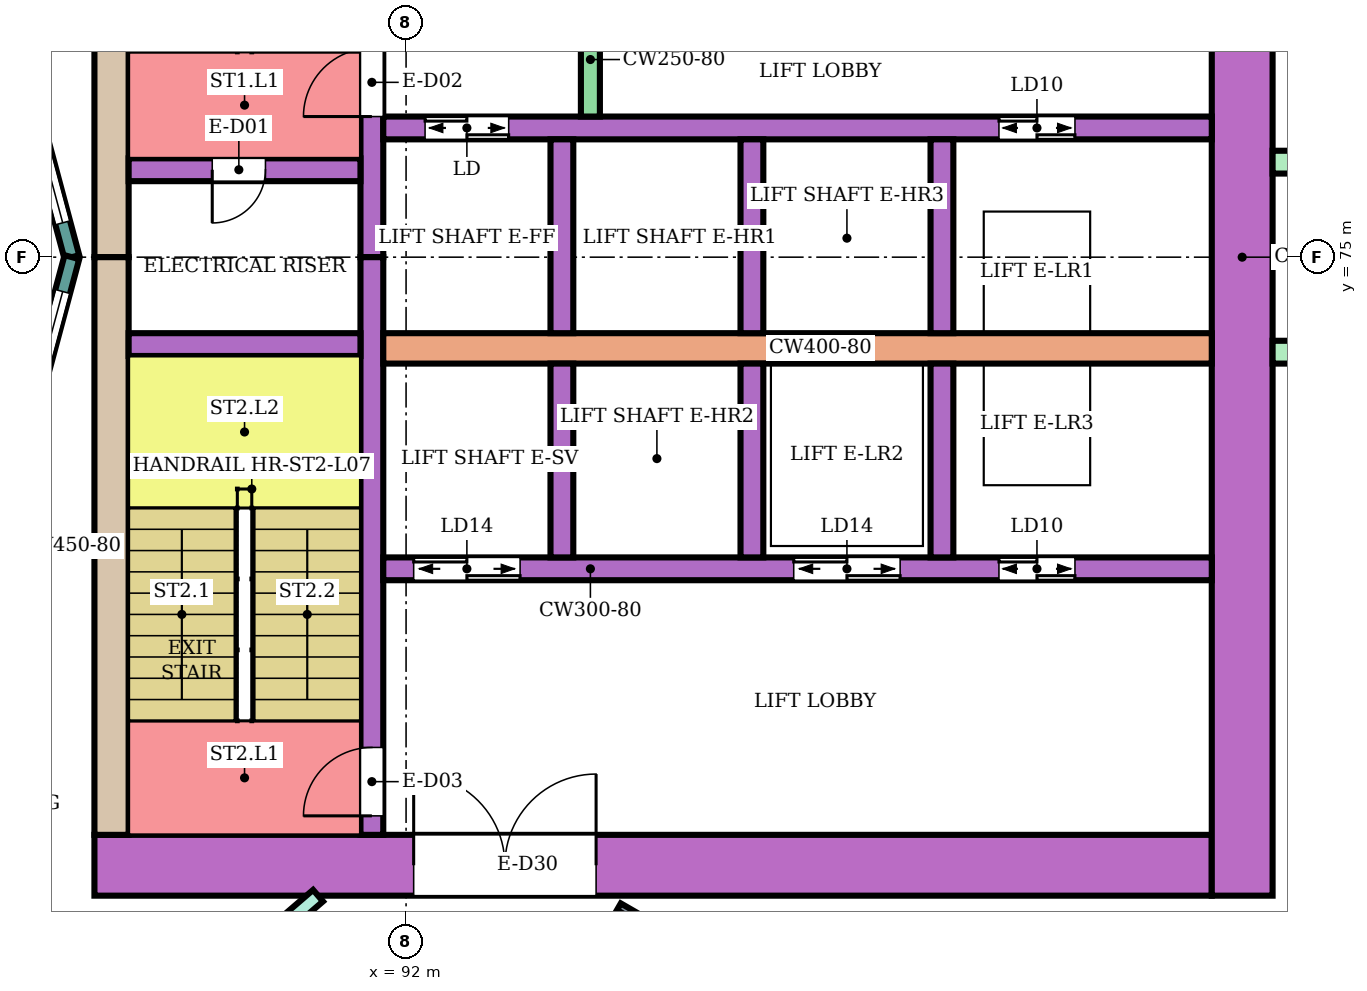
"""IFC4 building model, lengths in metres.
Left out: names, types, materials, properties, quantities, classifications, styles, units other than length and angle.
Written with IfcOpenShell. Run it as: python <this file> out.ifc"""

import sys

from ifc_helpers import new_model, si_unit, direction, frame, frame_2d, origin, place, context, subcontext, project, spatial, rectangle, extrude, element, fill, save


model = new_model("IFC4")
c1 = context("Model", 3, precision=1e-05, world=origin(), true_north=direction((0.0, 1.0)))
c2 = subcontext(c1, "Body", "Model", "MODEL_VIEW")
j1 = project(units=[si_unit("LENGTHUNIT", "METRE"), si_unit("PLANEANGLEUNIT", "RADIAN")], contexts=[c1])
p1 = place(None, origin())
s1 = spatial("IfcSite", under=j1, at=p1, CompositionType="ELEMENT")
p2 = place(p1, origin())
s2 = spatial("IfcBuilding", under=s1, at=p2, CompositionType="ELEMENT")
p3 = place(p2, frame((0.0, 0.0, 36.4)))
s3 = spatial("IfcBuildingStorey", under=s2, at=p3, CompositionType="ELEMENT", Elevation=36.4)
p4 = place(p3, frame((87.9, 67.0, 0.0), z_axis=(0.0, 0.0, 1.0), x_axis=(1.0, 0.0, 0.0)))
e1 = element("IfcWall", 1, at=p4, inside=s3, PredefinedType="SHEAR", context=c2, shape_type="SweptSolid", body=[
    extrude(rectangle(XDim=14.7, YDim=0.8, at=frame_2d((7.35, 0.0))), origin(), (0.0, 0.0, 1.0), 3.48),
])
p5 = place(p4, frame((4.2, 0.0, 0.0)))
e2 = element("IfcOpeningElement", 2, at=p5, cuts=e1, PredefinedType="OPENING", context=c2, shape_type="SweptSolid", body=[
    extrude(rectangle(XDim=2.4, YDim=2.4, at=frame_2d((1.2, 1.2))), frame((0.0, 0.41, 0.0), z_axis=(0.0, -1.0, 0.0), x_axis=(1.0, 0.0, 0.0)), (0.0, 0.0, 1.0), 0.82),
])
for number, where, z_axis, x_axis in (
    (3, (88.125, 75.0, 0.0), (0.0, 0.0, 1.0), (0.0, 1.0, 0.0)),
    (4, (88.125, 67.4, 0.0), (0.0, 0.0, 1.0), (0.0, 1.0, 0.0)),
):
    element("IfcWall", number, at=place(p3, frame(where, z_axis=z_axis, x_axis=x_axis)), inside=s3, PredefinedType="SHEAR", context=c2, shape_type="SweptSolid", body=[
        extrude(rectangle(XDim=7.6, YDim=0.45, at=frame_2d((3.8, 0.0))), origin(), (0.0, 0.0, 1.0), 3.48),
    ])
p6 = place(p3, frame((103.0, 66.6, 0.0), z_axis=(0.0, 0.0, 1.0), x_axis=(0.0, 1.0, 0.0)))
e5 = element("IfcWall", 5, at=p6, inside=s3, PredefinedType="SHEAR", context=c2, shape_type="SweptSolid", body=[
    extrude(rectangle(XDim=16.8, YDim=0.8, at=frame_2d((8.4, 0.0))), origin(), (0.0, 0.0, 1.0), 3.48),
])
p7 = place(p3, frame((91.55, 75.0, 0.0), z_axis=(0.0, 0.0, 1.0), x_axis=(0.0, 1.0, 0.0)))
e6 = element("IfcWall", 6, at=p7, inside=s3, PredefinedType="SHEAR", context=c2, shape_type="SweptSolid", body=[
    extrude(rectangle(XDim=7.6, YDim=0.3, at=frame_2d((3.8, 0.0))), origin(), (0.0, 0.0, 1.0), 3.48),
])
p8 = place(p7, frame((1.85, 0.0, 0.0)))
e7 = element("IfcOpeningElement", 7, at=p8, cuts=e6, PredefinedType="OPENING", context=c2, shape_type="SweptSolid", body=[
    extrude(rectangle(XDim=0.9, YDim=2.1, at=frame_2d((0.45, 1.05))), frame((0.0, 0.16, 0.0), z_axis=(0.0, -1.0, 0.0), x_axis=(1.0, 0.0, 0.0)), (0.0, 0.0, 1.0), 0.32),
])
p9 = place(p3, frame((91.55, 67.4, 0.0), z_axis=(0.0, 0.0, 1.0), x_axis=(0.0, 1.0, 0.0)))
e8 = element("IfcWall", 8, at=p9, inside=s3, PredefinedType="SHEAR", context=c2, shape_type="SweptSolid", body=[
    extrude(rectangle(XDim=7.6, YDim=0.3, at=frame_2d((3.8, 0.0))), origin(), (0.0, 0.0, 1.0), 3.48),
])
p10 = place(p9, frame((0.25, 0.0, 0.0)))
e9 = element("IfcOpeningElement", 9, at=p10, cuts=e8, PredefinedType="OPENING", context=c2, shape_type="SweptSolid", body=[
    extrude(rectangle(XDim=0.9, YDim=2.1, at=frame_2d((0.45, 1.05))), frame((0.0, 0.16, 0.0), z_axis=(0.0, -1.0, 0.0), x_axis=(1.0, 0.0, 0.0)), (0.0, 0.0, 1.0), 0.32),
])
p11 = place(p3, frame((88.35, 76.15, 0.0), z_axis=(0.0, 0.0, 1.0), x_axis=(1.0, 0.0, 0.0)))
e10 = element("IfcWall", 10, at=p11, inside=s3, PredefinedType="SHEAR", context=c2, shape_type="SweptSolid", body=[
    extrude(rectangle(XDim=3.05, YDim=0.3, at=frame_2d((1.525, 0.0))), origin(), (0.0, 0.0, 1.0), 3.48),
])
p12 = place(p11, frame((1.1, 0.0, 0.0)))
e11 = element("IfcOpeningElement", 11, at=p12, cuts=e10, PredefinedType="OPENING", context=c2, shape_type="SweptSolid", body=[
    extrude(rectangle(XDim=0.7, YDim=2.0, at=frame_2d((0.35, 1.0))), frame((0.0, 0.16, 0.0), z_axis=(0.0, -1.0, 0.0), x_axis=(1.0, 0.0, 0.0)), (0.0, 0.0, 1.0), 0.32),
])
p13 = place(p3, frame((88.35, 73.85, 0.0), z_axis=(0.0, 0.0, 1.0), x_axis=(1.0, 0.0, 0.0)))
e12 = element("IfcWall", 12, at=p13, inside=s3, PredefinedType="SHEAR", context=c2, shape_type="SweptSolid", body=[
    extrude(rectangle(XDim=3.05, YDim=0.3, at=frame_2d((1.525, 0.0))), origin(), (0.0, 0.0, 1.0), 3.48),
])
p14 = place(p3, frame((91.7, 76.7, 0.0), z_axis=(0.0, 0.0, 1.0), x_axis=(1.0, 0.0, 0.0)))
e13 = element("IfcWall", 13, at=p14, inside=s3, PredefinedType="SHEAR", context=c2, shape_type="SweptSolid", body=[
    extrude(rectangle(XDim=10.9, YDim=0.3, at=frame_2d((5.45, 0.0))), origin(), (0.0, 0.0, 1.0), 3.48),
])
p15 = place(p14, frame((0.55, 0.0, 0.0)))
e14 = element("IfcOpeningElement", 14, at=p15, cuts=e13, PredefinedType="OPENING", context=c2, shape_type="SweptSolid", body=[
    extrude(rectangle(XDim=1.1, YDim=2.1, at=frame_2d((0.55, 1.05))), frame((0.0, 0.16, 0.0), z_axis=(0.0, -1.0, 0.0), x_axis=(1.0, 0.0, 0.0)), (0.0, 0.0, 1.0), 0.32),
])
p16 = place(p14, frame((8.1, 0.0, 0.0)))
e15 = element("IfcOpeningElement", 15, at=p16, cuts=e13, PredefinedType="OPENING", context=c2, shape_type="SweptSolid", body=[
    extrude(rectangle(XDim=1.0, YDim=2.1, at=frame_2d((0.5, 1.05))), frame((0.0, 0.16, 0.0), z_axis=(0.0, -1.0, 0.0), x_axis=(1.0, 0.0, 0.0)), (0.0, 0.0, 1.0), 0.32),
])
p17 = place(p3, frame((91.7, 73.8, 0.0), z_axis=(0.0, 0.0, 1.0), x_axis=(1.0, 0.0, 0.0)))
e16 = element("IfcWall", 16, at=p17, inside=s3, PredefinedType="SHEAR", context=c2, shape_type="SweptSolid", body=[
    extrude(rectangle(XDim=10.9, YDim=0.4, at=frame_2d((5.45, 0.0))), origin(), (0.0, 0.0, 1.0), 3.48),
])
p18 = place(p3, frame((91.7, 70.9, 0.0), z_axis=(0.0, 0.0, 1.0), x_axis=(1.0, 0.0, 0.0)))
e17 = element("IfcWall", 17, at=p18, inside=s3, PredefinedType="SHEAR", context=c2, shape_type="SweptSolid", body=[
    extrude(rectangle(XDim=10.9, YDim=0.3, at=frame_2d((5.45, 0.0))), origin(), (0.0, 0.0, 1.0), 3.48),
])
p19 = place(p18, frame((0.4, 0.0, 0.0)))
e18 = element("IfcOpeningElement", 18, at=p19, cuts=e17, PredefinedType="OPENING", context=c2, shape_type="SweptSolid", body=[
    extrude(rectangle(XDim=1.4, YDim=2.1, at=frame_2d((0.7, 1.05))), frame((0.0, 0.16, 0.0), z_axis=(0.0, -1.0, 0.0), x_axis=(1.0, 0.0, 0.0)), (0.0, 0.0, 1.0), 0.32),
])
p20 = place(p18, frame((5.4, 0.0, 0.0)))
e19 = element("IfcOpeningElement", 19, at=p20, cuts=e17, PredefinedType="OPENING", context=c2, shape_type="SweptSolid", body=[
    extrude(rectangle(XDim=1.4, YDim=2.1, at=frame_2d((0.7, 1.05))), frame((0.0, 0.16, 0.0), z_axis=(0.0, -1.0, 0.0), x_axis=(1.0, 0.0, 0.0)), (0.0, 0.0, 1.0), 0.32),
])
p21 = place(p18, frame((8.1, 0.0, 0.0)))
e20 = element("IfcOpeningElement", 20, at=p21, cuts=e17, PredefinedType="OPENING", context=c2, shape_type="SweptSolid", body=[
    extrude(rectangle(XDim=1.0, YDim=2.1, at=frame_2d((0.5, 1.05))), frame((0.0, 0.16, 0.0), z_axis=(0.0, -1.0, 0.0), x_axis=(1.0, 0.0, 0.0)), (0.0, 0.0, 1.0), 0.32),
])
for number, where, z_axis, x_axis in (
    (21, (94.05, 74.0, 0.0), (0.0, 0.0, 1.0), (0.0, 1.0, 0.0)),
    (22, (96.55, 74.0, 0.0), (0.0, 0.0, 1.0), (0.0, 1.0, 0.0)),
    (23, (99.05, 74.0, 0.0), (0.0, 0.0, 1.0), (0.0, 1.0, 0.0)),
    (24, (94.05, 71.05, 0.0), (0.0, 0.0, 1.0), (0.0, 1.0, 0.0)),
    (25, (96.55, 71.05, 0.0), (0.0, 0.0, 1.0), (0.0, 1.0, 0.0)),
    (26, (99.05, 71.05, 0.0), (0.0, 0.0, 1.0), (0.0, 1.0, 0.0)),
):
    element("IfcWall", number, at=place(p3, frame(where, z_axis=z_axis, x_axis=x_axis)), inside=s3, PredefinedType="SHEAR", context=c2, shape_type="SweptSolid", body=[
        extrude(rectangle(XDim=2.55, YDim=0.3, at=frame_2d((1.275, 0.0))), origin(), (0.0, 0.0, 1.0), 3.48),
    ])
p22 = place(p3, frame((94.425, 76.85, 0.0), z_axis=(0.0, 0.0, 1.0), x_axis=(0.0, 1.0, 0.0)))
e27 = element("IfcWall", 27, at=p22, inside=s3, PredefinedType="SHEAR", context=c2, shape_type="SweptSolid", body=[
    extrude(rectangle(XDim=1.5, YDim=0.25, at=frame_2d((0.75, 0.0))), origin(), (0.0, 0.0, 1.0), 3.48),
])
for number, where, z_axis, x_axis in (
    (28, (103.4, 73.75, 0.0), (0.0, 0.0, 1.0), (1.0, 0.0, 0.0)),
    (29, (103.4, 76.25, 0.0), (0.0, 0.0, 1.0), (1.0, 0.0, 0.0)),
):
    element("IfcWall", number, at=place(p3, frame(where, z_axis=z_axis, x_axis=x_axis)), inside=s3, PredefinedType="NOTDEFINED", context=c2, shape_type="SweptSolid", body=[
        extrude(rectangle(XDim=2.416, YDim=0.3, at=frame_2d((1.208, 0.0))), origin(), (0.0, 0.0, 1.0), 3.8),
    ])
p23 = place(p3, frame((87.604, 75.0, 0.0), z_axis=(0.0, 0.0, 1.0), x_axis=(-0.258789828301, 0.965933654434, 0.0)))
e30 = element("IfcWall", 30, at=p23, inside=s3, PredefinedType="NOTDEFINED", context=c2, shape_type="SweptSolid", body=[
    extrude(rectangle(XDim=3.936, YDim=0.2, at=frame_2d((1.968, 0.0))), origin(), (0.0, 0.0, 1.0), 3.8),
])
p24 = place(p23, frame((0.468, 0.0, 0.9)))
e31 = element("IfcOpeningElement", 31, at=p24, cuts=e30, PredefinedType="OPENING", context=c2, shape_type="SweptSolid", body=[
    extrude(rectangle(XDim=3.0, YDim=2.3, at=frame_2d((1.5, 1.15))), frame((0.0, 0.11, 0.0), z_axis=(0.0, -1.0, 0.0), x_axis=(1.0, 0.0, 0.0)), (0.0, 0.0, 1.0), 0.22),
])
p25 = place(p3, frame((86.585, 71.198, 0.0), z_axis=(0.0, 0.0, 1.0), x_axis=(0.258789828301, 0.965933654434, 0.0)))
e32 = element("IfcWall", 32, at=p25, inside=s3, PredefinedType="NOTDEFINED", context=c2, shape_type="SweptSolid", body=[
    extrude(rectangle(XDim=3.936, YDim=0.2, at=frame_2d((1.968, 0.0))), origin(), (0.0, 0.0, 1.0), 3.8),
])
p26 = place(p25, frame((0.468, 0.0, 0.9)))
e33 = element("IfcOpeningElement", 33, at=p26, cuts=e32, PredefinedType="OPENING", context=c2, shape_type="SweptSolid", body=[
    extrude(rectangle(XDim=3.0, YDim=2.3, at=frame_2d((1.5, 1.15))), frame((0.0, 0.11, 0.0), z_axis=(0.0, -1.0, 0.0), x_axis=(1.0, 0.0, 0.0)), (0.0, 0.0, 1.0), 0.22),
])
p27 = place(p3, frame((86.877, 63.189, 0.0), z_axis=(0.0, 0.0, 1.0), x_axis=(0.758075808328, 0.652166442581, 0.0)))
e34 = element("IfcWall", 34, at=p27, inside=s3, PredefinedType="PARTITIONING", context=c2, shape_type="SweptSolid", body=[
    extrude(rectangle(XDim=5.23, YDim=0.2, at=frame_2d((2.615, 0.0))), origin(), (0.0, 0.0, 1.0), 3.35),
])
p28 = place(p27, frame((2.165, 0.0, 0.0)))
e35 = element("IfcOpeningElement", 35, at=p28, cuts=e34, PredefinedType="OPENING", context=c2, shape_type="SweptSolid", body=[
    extrude(rectangle(XDim=0.9, YDim=2.1, at=frame_2d((0.45, 1.05))), frame((0.0, 0.11, 0.0), z_axis=(0.0, -1.0, 0.0), x_axis=(1.0, 0.0, 0.0)), (0.0, 0.0, 1.0), 0.22),
])
p29 = place(p3, frame((94.8, 66.455, 0.0), z_axis=(0.0, 0.0, 1.0), x_axis=(0.86602264145, -0.500004784474, 0.0)))
e36 = element("IfcWall", 36, at=p29, inside=s3, PredefinedType="PARTITIONING", context=c2, shape_type="SweptSolid", body=[
    extrude(rectangle(XDim=8.708, YDim=0.1, at=frame_2d((4.354, 0.0))), origin(), (0.0, 0.0, 1.0), 3.35),
])
p30 = place(p29, frame((3.879, 0.0, 0.0)))
e37 = element("IfcOpeningElement", 37, at=p30, cuts=e36, PredefinedType="OPENING", context=c2, shape_type="SweptSolid", body=[
    extrude(rectangle(XDim=0.9, YDim=2.1, at=frame_2d((0.45, 1.05))), frame((0.0, 0.06, 0.0), z_axis=(0.0, -1.0, 0.0), x_axis=(1.0, 0.0, 0.0)), (0.0, 0.0, 1.0), 0.12),
])
p31 = place(p24, origin())
e38 = element("IfcWindow", 38, at=p31, inside=s3, PartitioningType="SINGLE_PANEL", PredefinedType="WINDOW", context=c2, shape_type="SweptSolid", body=[
    extrude(rectangle(XDim=3.0, YDim=2.3, at=frame_2d((1.5, 1.15))), frame((0.0, 0.03, 0.0), z_axis=(0.0, -1.0, 0.0), x_axis=(1.0, 0.0, 0.0)), (0.0, 0.0, 1.0), 0.06),
])
fill(e31, e38)
p32 = place(p26, origin())
e39 = element("IfcWindow", 39, at=p32, inside=s3, PartitioningType="SINGLE_PANEL", PredefinedType="WINDOW", context=c2, shape_type="SweptSolid", body=[
    extrude(rectangle(XDim=3.0, YDim=2.3, at=frame_2d((1.5, 1.15))), frame((0.0, 0.03, 0.0), z_axis=(0.0, -1.0, 0.0), x_axis=(1.0, 0.0, 0.0)), (0.0, 0.0, 1.0), 0.06),
])
fill(e33, e39)
p33 = place(p12, frame((0.7, 0.0, 0.0), z_axis=(0.0, 0.0, 1.0), x_axis=(-1.0, 0.0, 0.0)))
e40 = element("IfcDoor", 40, at=p33, inside=s3, OperationType="SINGLE_SWING_RIGHT", PredefinedType="DOOR", context=c2, shape_type="SweptSolid", body=[
    extrude(rectangle(XDim=0.7, YDim=2.0, at=frame_2d((0.35, 1.0))), frame((0.0, 0.025, 0.0), z_axis=(0.0, -1.0, 0.0), x_axis=(1.0, 0.0, 0.0)), (0.0, 0.0, 1.0), 0.05),
])
fill(e11, e40)
p34 = place(p8, origin())
e41 = element("IfcDoor", 41, at=p34, inside=s3, OperationType="SINGLE_SWING_LEFT", PredefinedType="DOOR", context=c2, shape_type="SweptSolid", body=[
    extrude(rectangle(XDim=0.9, YDim=2.1, at=frame_2d((0.45, 1.05))), frame((0.0, 0.025, 0.0), z_axis=(0.0, -1.0, 0.0), x_axis=(1.0, 0.0, 0.0)), (0.0, 0.0, 1.0), 0.05),
])
fill(e7, e41)
p35 = place(p10, origin())
e42 = element("IfcDoor", 42, at=p35, inside=s3, OperationType="SINGLE_SWING_LEFT", PredefinedType="DOOR", context=c2, shape_type="SweptSolid", body=[
    extrude(rectangle(XDim=0.9, YDim=2.1, at=frame_2d((0.45, 1.05))), frame((0.0, 0.025, 0.0), z_axis=(0.0, -1.0, 0.0), x_axis=(1.0, 0.0, 0.0)), (0.0, 0.0, 1.0), 0.05),
])
fill(e9, e42)
p36 = place(p15, origin())
e43 = element("IfcDoor", 43, at=p36, inside=s3, OperationType="DOUBLE_DOOR_SLIDING", PredefinedType="DOOR", context=c2, shape_type="SweptSolid", body=[
    extrude(rectangle(XDim=1.1, YDim=2.1, at=frame_2d((0.55, 1.05))), frame((0.0, 0.025, 0.0), z_axis=(0.0, -1.0, 0.0), x_axis=(1.0, 0.0, 0.0)), (0.0, 0.0, 1.0), 0.05),
])
fill(e14, e43)
p37 = place(p16, origin())
e44 = element("IfcDoor", 44, at=p37, inside=s3, OperationType="DOUBLE_DOOR_SLIDING", PredefinedType="DOOR", context=c2, shape_type="SweptSolid", body=[
    extrude(rectangle(XDim=1.0, YDim=2.1, at=frame_2d((0.5, 1.05))), frame((0.0, 0.025, 0.0), z_axis=(0.0, -1.0, 0.0), x_axis=(1.0, 0.0, 0.0)), (0.0, 0.0, 1.0), 0.05),
])
fill(e15, e44)
p38 = place(p19, origin())
e45 = element("IfcDoor", 45, at=p38, inside=s3, OperationType="DOUBLE_DOOR_SLIDING", PredefinedType="DOOR", context=c2, shape_type="SweptSolid", body=[
    extrude(rectangle(XDim=1.4, YDim=2.1, at=frame_2d((0.7, 1.05))), frame((0.0, 0.025, 0.0), z_axis=(0.0, -1.0, 0.0), x_axis=(1.0, 0.0, 0.0)), (0.0, 0.0, 1.0), 0.05),
])
fill(e18, e45)
p39 = place(p20, origin())
e46 = element("IfcDoor", 46, at=p39, inside=s3, OperationType="DOUBLE_DOOR_SLIDING", PredefinedType="DOOR", context=c2, shape_type="SweptSolid", body=[
    extrude(rectangle(XDim=1.4, YDim=2.1, at=frame_2d((0.7, 1.05))), frame((0.0, 0.025, 0.0), z_axis=(0.0, -1.0, 0.0), x_axis=(1.0, 0.0, 0.0)), (0.0, 0.0, 1.0), 0.05),
])
fill(e19, e46)
p40 = place(p21, origin())
e47 = element("IfcDoor", 47, at=p40, inside=s3, OperationType="DOUBLE_DOOR_SLIDING", PredefinedType="DOOR", context=c2, shape_type="SweptSolid", body=[
    extrude(rectangle(XDim=1.0, YDim=2.1, at=frame_2d((0.5, 1.05))), frame((0.0, 0.025, 0.0), z_axis=(0.0, -1.0, 0.0), x_axis=(1.0, 0.0, 0.0)), (0.0, 0.0, 1.0), 0.05),
])
fill(e20, e47)
p41 = place(p5, origin())
e48 = element("IfcDoor", 48, at=p41, inside=s3, OperationType="DOUBLE_DOOR_SINGLE_SWING", PredefinedType="DOOR", context=c2, shape_type="SweptSolid", body=[
    extrude(rectangle(XDim=2.4, YDim=2.4, at=frame_2d((1.2, 1.2))), frame((0.0, 0.025, 0.0), z_axis=(0.0, -1.0, 0.0), x_axis=(1.0, 0.0, 0.0)), (0.0, 0.0, 1.0), 0.05),
])
fill(e2, e48)
save(model, sys.argv[1])
